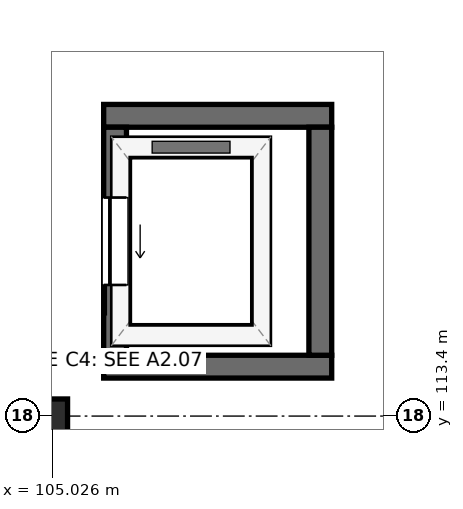
"""IFC4 building model, lengths in metres.
Left out: names, types, materials, properties, quantities, classifications, styles, units other than length and angle.
Written with IfcOpenShell. Run it as: python <this file> out.ifc"""

import sys

from ifc_helpers import new_model, si_unit, direction, frame, frame_2d, origin, origin_2d, place, context, subcontext, project, spatial, rectangle, extrude, element, fill, save


model = new_model("IFC4")
c1 = context("Model", 3, precision=1e-05, world=origin(), true_north=direction((0.0, 1.0)))
c2 = subcontext(c1, "Body", "Model", "MODEL_VIEW")
j1 = project(units=[si_unit("LENGTHUNIT", "METRE"), si_unit("PLANEANGLEUNIT", "RADIAN")], contexts=[c1])
p1 = place(None, origin())
s1 = spatial("IfcSite", under=j1, at=p1, CompositionType="ELEMENT")
p2 = place(p1, origin())
s2 = spatial("IfcBuilding", under=s1, at=p2, CompositionType="ELEMENT")
p3 = place(p2, frame((0.0, 0.0, -4.2)))
s3 = spatial("IfcBuildingStorey", under=s2, at=p3, CompositionType="ELEMENT", Elevation=-4.2)
p4 = place(p3, frame((105.0, 113.4, 0.0), z_axis=(0.0, 0.0, 1.0), x_axis=(1.0, 0.0, 0.0)))
e1 = element("IfcColumn", 1, at=p4, inside=s3, PredefinedType="COLUMN", context=c2, shape_type="SweptSolid", body=[
    extrude(rectangle(XDim=0.45, YDim=0.45, at=origin_2d()), origin(), (0.0, 0.0, 1.0), 4.2),
])
for number, where, z_axis, x_axis in (
    (2, (105.7, 114.05, 0.0), (0.0, 0.0, 1.0), (1.0, 0.0, 0.0)),
    (3, (105.7, 117.35, 0.0), (0.0, 0.0, 1.0), (1.0, 0.0, 0.0)),
):
    element("IfcWall", number, at=place(p3, frame(where, z_axis=z_axis, x_axis=x_axis)), inside=s3, PredefinedType="SHEAR", context=c2, shape_type="SweptSolid", body=[
        extrude(rectangle(XDim=3.0, YDim=0.3, at=frame_2d((1.5, 0.0))), origin(), (0.0, 0.0, 1.0), 3.92),
    ])
p5 = place(p3, frame((105.85, 114.2, 0.0), z_axis=(0.0, 0.0, 1.0), x_axis=(0.0, 1.0, 0.0)))
e4 = element("IfcWall", 4, at=p5, inside=s3, PredefinedType="SHEAR", context=c2, shape_type="SweptSolid", body=[
    extrude(rectangle(XDim=3.0, YDim=0.3, at=frame_2d((1.5, 0.0))), origin(), (0.0, 0.0, 1.0), 3.92),
])
p6 = place(p5, frame((0.925, 0.0, 0.0)))
e5 = element("IfcOpeningElement", 5, at=p6, cuts=e4, PredefinedType="OPENING", context=c2, shape_type="SweptSolid", body=[
    extrude(rectangle(XDim=1.15, YDim=2.15, at=frame_2d((0.575, 1.075))), frame((0.0, 0.165, 0.0), z_axis=(0.0, -1.0, 0.0), x_axis=(1.0, 0.0, 0.0)), (0.0, 0.0, 1.0), 0.33),
])
p7 = place(p3, frame((108.55, 114.2, 0.0), z_axis=(0.0, 0.0, 1.0), x_axis=(0.0, 1.0, 0.0)))
e6 = element("IfcWall", 6, at=p7, inside=s3, PredefinedType="SHEAR", context=c2, shape_type="SweptSolid", body=[
    extrude(rectangle(XDim=3.0, YDim=0.3, at=frame_2d((1.5, 0.0))), origin(), (0.0, 0.0, 1.0), 3.92),
])
p8 = place(p6, origin())
e7 = element("IfcDoor", 7, at=p8, inside=s3, OperationType="SLIDING_TO_LEFT", PredefinedType="DOOR", context=c2, shape_type="SweptSolid", body=[
    extrude(rectangle(XDim=1.15, YDim=2.15, at=frame_2d((0.575, 1.075))), frame((0.0, 0.025, 0.0), z_axis=(0.0, -1.0, 0.0), x_axis=(1.0, 0.0, 0.0)), (0.0, 0.0, 1.0), 0.05),
])
fill(e5, e7)
save(model, sys.argv[1])
